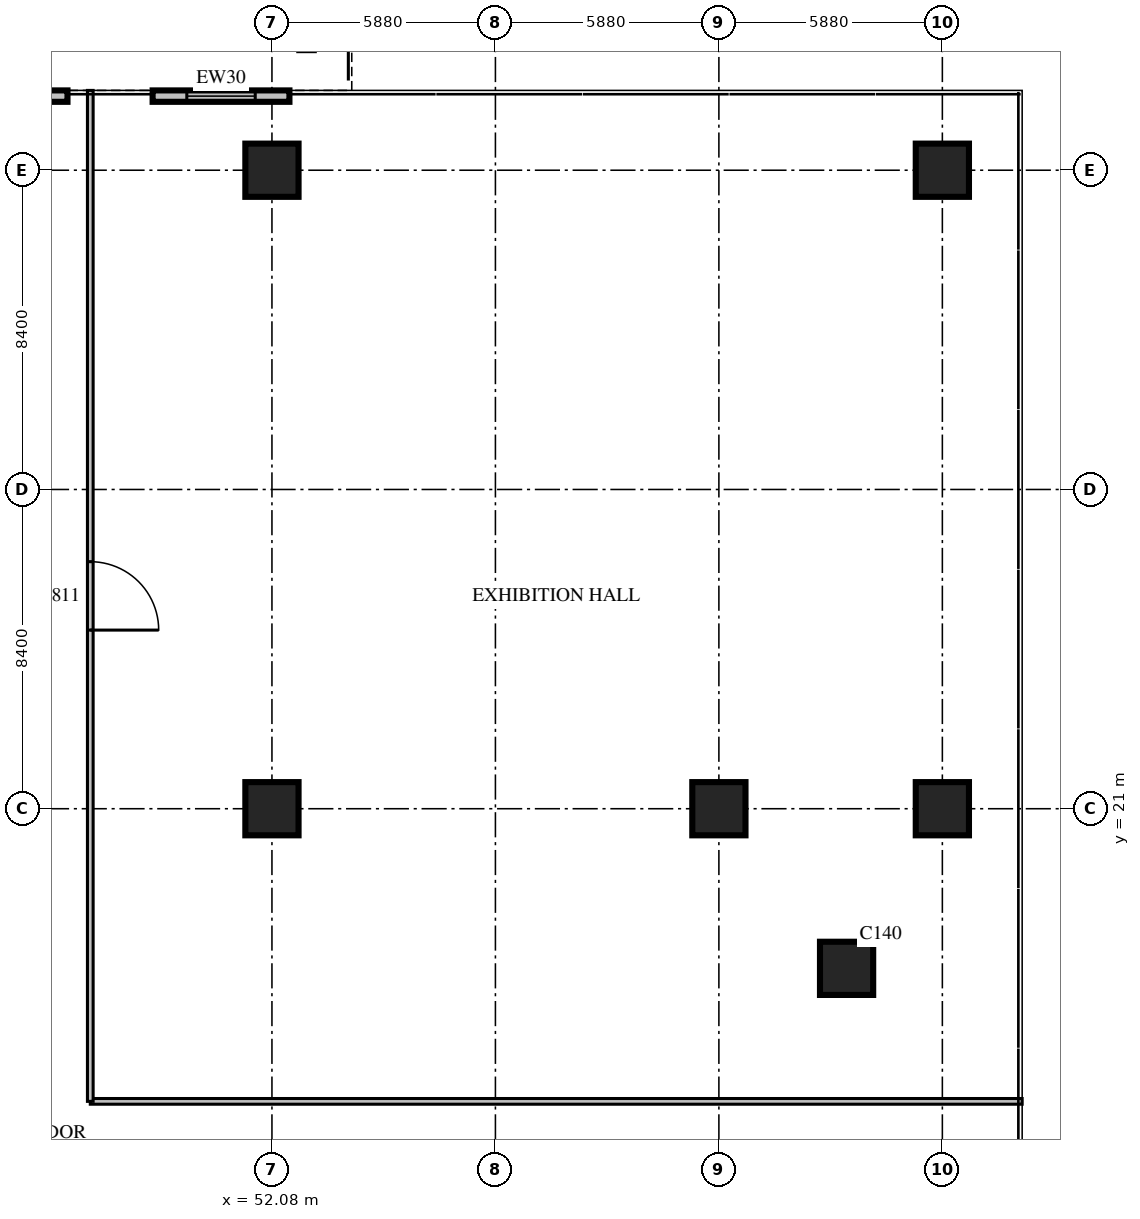
"""IFC4 building model, lengths in metres.
Left out: names, types, materials, properties, quantities, classifications, styles, units other than length and angle.
Written with IfcOpenShell. Run it as: python <this file> out.ifc"""

import sys

from ifc_helpers import new_model, si_unit, direction, frame, frame_2d, origin, origin_2d, place, context, subcontext, project, spatial, rectangle, extrude, source, transform, mapped, element, fill, save


model = new_model("IFC4")
c1 = context("Model", 3, precision=1e-05, world=origin(), true_north=direction((0.0, 1.0)))
c2 = subcontext(c1, "Body", "Model", "MODEL_VIEW")
j1 = project(units=[si_unit("LENGTHUNIT", "METRE"), si_unit("PLANEANGLEUNIT", "RADIAN")], contexts=[c1])
p1 = place(None, origin())
s1 = spatial("IfcSite", under=j1, at=p1, CompositionType="ELEMENT")
p2 = place(p1, origin())
s2 = spatial("IfcBuilding", under=s1, at=p2, CompositionType="ELEMENT")
p3 = place(p2, frame((0.0, 0.0, 29.1)))
s3 = spatial("IfcBuildingStorey", under=s2, at=p3, CompositionType="ELEMENT", Elevation=29.1)
m1 = source(origin(), c2, "Body", "SweptSolid", [
    extrude(rectangle(XDim=1.4, YDim=1.4, at=origin_2d()), origin(), (0.0, 0.0, 1.0), 5.4),
])
for number, where, z_axis, x_axis in (
    (1, (52.08, 21.0, 0.0), (0.0, 0.0, 1.0), (1.0, 0.0, 0.0)),
    (2, (52.08, 37.8, 0.0), (0.0, 0.0, 1.0), (1.0, 0.0, 0.0)),
    (3, (63.84, 21.0, 0.0), (0.0, 0.0, 1.0), (1.0, 0.0, 0.0)),
    (4, (67.2, 16.8, 0.0), (0.0, 0.0, 1.0), (1.0, 0.0, 0.0)),
    (5, (69.72, 21.0, 0.0), (0.0, 0.0, 1.0), (1.0, 0.0, 0.0)),
    (6, (69.72, 37.8, 0.0), (0.0, 0.0, 1.0), (1.0, 0.0, 0.0)),
):
    element("IfcColumn", number, at=place(p3, frame(where, z_axis=z_axis, x_axis=x_axis)), inside=s3, PredefinedType="COLUMN", context=c2, shape_type="MappedRepresentation", body=[
        mapped(m1, transform((0.0, 0.0, 0.0), scale=1.0)),
    ])
m2 = source(origin(), c2, "Body", "SweptSolid", [
    extrude(rectangle(XDim=3.6, YDim=0.3, at=frame_2d((1.8, 0.0))), origin(), (0.0, 0.0, 1.0), 4.8),
])
p4 = place(p3, frame((52.54, 39.75, 0.0), z_axis=(0.0, 0.0, 1.0), x_axis=(-1.0, 0.0, 0.0)))
e7 = element("IfcWall", 7, at=p4, inside=s3, PredefinedType="STANDARD", context=c2, shape_type="MappedRepresentation", body=[
    mapped(m2, transform((0.0, 0.0, 0.0), scale=1.0)),
])
m3 = source(origin(), c2, "Body", "SweptSolid", [
    extrude(rectangle(XDim=1.8, YDim=2.4, at=frame_2d((0.9, 1.2))), frame((0.0, 0.16, 0.0), z_axis=(0.0, -1.0, 0.0), x_axis=(1.0, 0.0, 0.0)), (0.0, 0.0, 1.0), 0.32),
])
p5 = place(p4, frame((0.9, 0.0, 0.0)))
e8 = element("IfcOpeningElement", 8, at=p5, cuts=e7, PredefinedType="OPENING", context=c2, shape_type="MappedRepresentation", body=[
    mapped(m3, transform((0.0, 0.0, 0.0), scale=1.0)),
])
p6 = place(p3, frame((46.7, 39.75, 0.0), z_axis=(0.0, 0.0, 1.0), x_axis=(-1.0, 0.0, 0.0)))
e9 = element("IfcWall", 9, at=p6, inside=s3, PredefinedType="STANDARD", context=c2, shape_type="MappedRepresentation", body=[
    mapped(m2, transform((0.0, 0.0, 0.0), scale=1.0)),
])
p7 = place(p6, frame((0.9, 0.0, 0.0)))
e10 = element("IfcOpeningElement", 10, at=p7, cuts=e9, PredefinedType="OPENING", context=c2, shape_type="MappedRepresentation", body=[
    mapped(m3, transform((0.0, 0.0, 0.0), scale=1.0)),
])
m4 = source(origin(), c2, "Body", "SweptSolid", [
    extrude(rectangle(XDim=24.52, YDim=0.15, at=frame_2d((12.26, 0.0))), origin(), (0.0, 0.0, 1.0), 4.8),
])
p8 = place(p3, frame((47.3, 13.3, 0.0), z_axis=(0.0, 0.0, 1.0), x_axis=(1.0, 0.0, 0.0)))
e11 = element("IfcWall", 11, at=p8, inside=s3, PredefinedType="PARTITIONING", context=c2, shape_type="MappedRepresentation", body=[
    mapped(m4, transform((0.0, 0.0, 0.0), scale=1.0)),
])
m5 = source(origin(), c2, "Body", "SweptSolid", [
    extrude(rectangle(XDim=26.6, YDim=0.15, at=frame_2d((13.3, 0.0))), origin(), (0.0, 0.0, 1.0), 4.8),
])
p9 = place(p3, frame((47.3, 13.3, 0.0), z_axis=(0.0, 0.0, 1.0), x_axis=(0.0, 1.0, 0.0)))
e12 = element("IfcWall", 12, at=p9, inside=s3, PredefinedType="PARTITIONING", context=c2, shape_type="MappedRepresentation", body=[
    mapped(m5, transform((0.0, 0.0, 0.0), scale=1.0)),
])
m6 = source(origin(), c2, "Body", "SweptSolid", [
    extrude(rectangle(XDim=1.8, YDim=2.1, at=frame_2d((0.9, 1.05))), frame((0.0, 0.085, 0.0), z_axis=(0.0, -1.0, 0.0), x_axis=(1.0, 0.0, 0.0)), (0.0, 0.0, 1.0), 0.17),
])
p10 = place(p9, frame((12.4, 0.0, 0.0)))
e13 = element("IfcOpeningElement", 13, at=p10, cuts=e12, PredefinedType="OPENING", context=c2, shape_type="MappedRepresentation", body=[
    mapped(m6, transform((0.0, 0.0, 0.0), scale=1.0)),
])
m7 = source(origin(), c2, "Body", "SweptSolid", [
    extrude(rectangle(XDim=1.8, YDim=2.4, at=frame_2d((0.9, 1.2))), frame((0.0, 0.025, 0.0), z_axis=(0.0, -1.0, 0.0), x_axis=(1.0, 0.0, 0.0)), (0.0, 0.0, 1.0), 0.05),
])
p11 = place(p5, origin())
e14 = element("IfcDoor", 14, at=p11, inside=s3, OperationType="SLIDING_TO_LEFT", PredefinedType="DOOR", context=c2, shape_type="MappedRepresentation", body=[
    mapped(m7, transform((0.0, 0.0, 0.0), scale=1.0)),
])
fill(e8, e14)
m8 = source(origin(), c2, "Body", "SweptSolid", [
    extrude(rectangle(XDim=1.8, YDim=2.1, at=frame_2d((0.9, 1.05))), frame((0.0, 0.025, 0.0), z_axis=(0.0, -1.0, 0.0), x_axis=(1.0, 0.0, 0.0)), (0.0, 0.0, 1.0), 0.05),
])
p12 = place(p10, origin())
e15 = element("IfcDoor", 15, at=p12, inside=s3, OperationType="DOUBLE_DOOR_SINGLE_SWING", PredefinedType="DOOR", context=c2, shape_type="MappedRepresentation", body=[
    mapped(m8, transform((0.0, 0.0, 0.0), scale=1.0)),
])
fill(e13, e15)
save(model, sys.argv[1])
